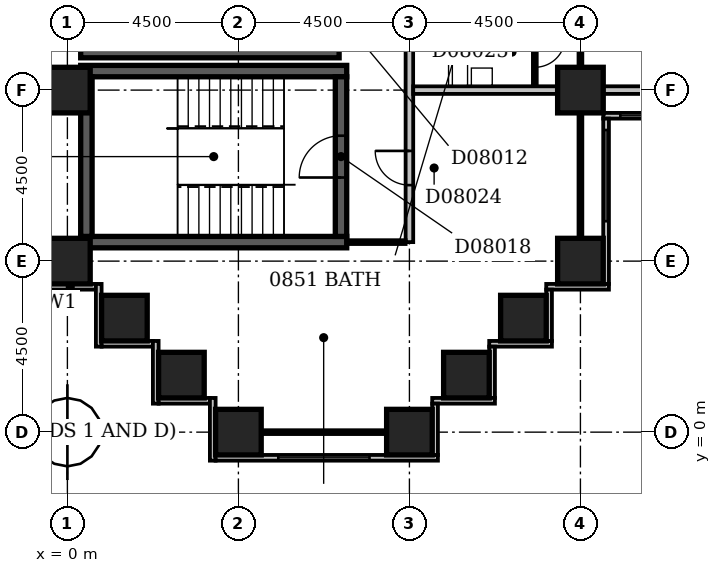
"""IFC4 building model, lengths in metres.
Left out: names, types, materials, properties, quantities, classifications, styles, units other than length and angle.
Written with IfcOpenShell. Run it as: python <this file> out.ifc"""

import sys

from ifc_helpers import new_model, si_unit, direction, frame, frame_2d, origin, origin_2d, place, context, subcontext, project, spatial, rectangle, extrude, element, fill, save


model = new_model("IFC4")
c1 = context("Model", 3, precision=1e-05, world=origin(), true_north=direction((0.0, 1.0)))
c2 = subcontext(c1, "Body", "Model", "MODEL_VIEW")
j1 = project(units=[si_unit("LENGTHUNIT", "METRE"), si_unit("PLANEANGLEUNIT", "RADIAN")], contexts=[c1])
p1 = place(None, origin())
s1 = spatial("IfcSite", under=j1, at=p1, CompositionType="ELEMENT")
p2 = place(p1, origin())
s2 = spatial("IfcBuilding", under=s1, at=p2, CompositionType="ELEMENT")
p3 = place(p2, frame((0.0, 0.0, 39.8)))
s3 = spatial("IfcBuildingStorey", under=s2, at=p3, CompositionType="ELEMENT", Elevation=39.8)
for number, where, z_axis, x_axis in (
    (1, (0.35, 5.0, -0.3), (0.0, 0.0, 1.0), (1.0, 0.0, 0.0)),
    (2, (0.35, 9.5, -0.3), (0.0, 0.0, 1.0), (1.0, 0.0, 0.0)),
):
    element("IfcWall", number, at=place(p3, frame(where, z_axis=z_axis, x_axis=x_axis)), inside=s3, PredefinedType="SHEAR", context=c2, shape_type="SweptSolid", body=[
        extrude(rectangle(XDim=7.0, YDim=0.3, at=frame_2d((3.5, 0.0))), origin(), (0.0, 0.0, 1.0), 3.6),
    ])
p4 = place(p3, frame((0.35, 10.0, -0.3), z_axis=(0.0, 0.0, 1.0), x_axis=(1.0, 0.0, 0.0)))
e3 = element("IfcWall", 3, at=p4, inside=s3, PredefinedType="SHEAR", context=c2, shape_type="SweptSolid", body=[
    extrude(rectangle(XDim=6.8, YDim=0.3, at=frame_2d((3.4, 0.0))), origin(), (0.0, 0.0, 1.0), 3.6),
])
p5 = place(p3, frame((0.5, 5.15, -0.3), z_axis=(0.0, 0.0, 1.0), x_axis=(0.0, 1.0, 0.0)))
e4 = element("IfcWall", 4, at=p5, inside=s3, PredefinedType="SHEAR", context=c2, shape_type="SweptSolid", body=[
    extrude(rectangle(XDim=4.2, YDim=0.3, at=frame_2d((2.1, 0.0))), origin(), (0.0, 0.0, 1.0), 3.6),
])
p6 = place(p3, frame((7.2, 5.15, -0.3), z_axis=(0.0, 0.0, 1.0), x_axis=(0.0, 1.0, 0.0)))
e5 = element("IfcWall", 5, at=p6, inside=s3, PredefinedType="SHEAR", context=c2, shape_type="SweptSolid", body=[
    extrude(rectangle(XDim=4.2, YDim=0.3, at=frame_2d((2.1, 0.0))), origin(), (0.0, 0.0, 1.0), 3.6),
])
p7 = place(p6, frame((1.55, 0.0, 0.3)))
e6 = element("IfcOpeningElement", 6, at=p7, cuts=e5, PredefinedType="OPENING", context=c2, shape_type="SweptSolid", body=[
    extrude(rectangle(XDim=1.1, YDim=2.1, at=frame_2d((0.55, 1.05))), frame((0.0, 0.162, 0.0), z_axis=(0.0, -1.0, 0.0), x_axis=(1.0, 0.0, 0.0)), (0.0, 0.0, 1.0), 0.324),
])
for number, where, z_axis, x_axis in (
    (7, (4.5, 0.0, -0.3), (0.0, 0.0, 1.0), (1.0, 0.0, 0.0)),
    (8, (9.0, 0.0, -0.3), (0.0, 0.0, 1.0), (1.0, 0.0, 0.0)),
    (9, (3.0, 1.5, -0.3), (0.0, 0.0, 1.0), (1.0, 0.0, 0.0)),
    (10, (10.5, 1.5, -0.3), (0.0, 0.0, 1.0), (1.0, 0.0, 0.0)),
    (11, (1.5, 3.0, -0.3), (0.0, 0.0, 1.0), (1.0, 0.0, 0.0)),
    (12, (12.0, 3.0, -0.3), (0.0, 0.0, 1.0), (1.0, 0.0, 0.0)),
    (13, (0.0, 4.5, -0.3), (0.0, 0.0, 1.0), (1.0, 0.0, 0.0)),
    (14, (13.5, 4.5, -0.3), (0.0, 0.0, 1.0), (1.0, 0.0, 0.0)),
    (15, (0.0, 9.0, -0.3), (0.0, 0.0, 1.0), (1.0, 0.0, 0.0)),
    (16, (13.5, 9.0, -0.3), (0.0, 0.0, 1.0), (1.0, 0.0, 0.0)),
):
    element("IfcColumn", number, at=place(p3, frame(where, z_axis=z_axis, x_axis=x_axis)), inside=s3, PredefinedType="COLUMN", context=c2, shape_type="SweptSolid", body=[
        extrude(rectangle(XDim=1.2, YDim=1.2, at=origin_2d()), origin(), (0.0, 0.0, 1.0), 3.6),
    ])
p8 = place(p3, frame((9.675, -0.6, 0.0), z_axis=(0.0, 0.0, 1.0), x_axis=(0.0, 1.0, 0.0)))
e17 = element("IfcWall", 17, at=p8, inside=s3, PredefinedType="STANDARD", context=c2, shape_type="SweptSolid", body=[
    extrude(rectangle(XDim=1.35, YDim=0.15, at=frame_2d((0.675, 0.0))), origin(), (0.0, 0.0, 1.0), 2.7),
])
p9 = place(p3, frame((9.6, 0.825, 0.0), z_axis=(0.0, 0.0, 1.0), x_axis=(1.0, 0.0, 0.0)))
e18 = element("IfcWall", 18, at=p9, inside=s3, PredefinedType="STANDARD", context=c2, shape_type="SweptSolid", body=[
    extrude(rectangle(XDim=1.65, YDim=0.15, at=frame_2d((0.825, 0.0))), origin(), (0.0, 0.0, 1.0), 2.7),
])
p10 = place(p3, frame((11.175, 0.9, 0.0), z_axis=(0.0, 0.0, 1.0), x_axis=(0.0, 1.0, 0.0)))
e19 = element("IfcWall", 19, at=p10, inside=s3, PredefinedType="STANDARD", context=c2, shape_type="SweptSolid", body=[
    extrude(rectangle(XDim=1.35, YDim=0.15, at=frame_2d((0.675, 0.0))), origin(), (0.0, 0.0, 1.0), 2.7),
])
p11 = place(p3, frame((11.1, 2.325, 0.0), z_axis=(0.0, 0.0, 1.0), x_axis=(1.0, 0.0, 0.0)))
e20 = element("IfcWall", 20, at=p11, inside=s3, PredefinedType="STANDARD", context=c2, shape_type="SweptSolid", body=[
    extrude(rectangle(XDim=1.65, YDim=0.15, at=frame_2d((0.825, 0.0))), origin(), (0.0, 0.0, 1.0), 2.7),
])
p12 = place(p3, frame((12.675, 2.4, 0.0), z_axis=(0.0, 0.0, 1.0), x_axis=(0.0, 1.0, 0.0)))
e21 = element("IfcWall", 21, at=p12, inside=s3, PredefinedType="STANDARD", context=c2, shape_type="SweptSolid", body=[
    extrude(rectangle(XDim=1.35, YDim=0.15, at=frame_2d((0.675, 0.0))), origin(), (0.0, 0.0, 1.0), 2.7),
])
p13 = place(p3, frame((12.6, 3.825, 0.0), z_axis=(0.0, 0.0, 1.0), x_axis=(1.0, 0.0, 0.0)))
e22 = element("IfcWall", 22, at=p13, inside=s3, PredefinedType="STANDARD", context=c2, shape_type="SweptSolid", body=[
    extrude(rectangle(XDim=1.65, YDim=0.15, at=frame_2d((0.825, 0.0))), origin(), (0.0, 0.0, 1.0), 2.7),
])
p14 = place(p3, frame((14.175, 3.9, 0.0), z_axis=(0.0, 0.0, 1.0), x_axis=(0.0, 1.0, 0.0)))
e23 = element("IfcWall", 23, at=p14, inside=s3, PredefinedType="STANDARD", context=c2, shape_type="SweptSolid", body=[
    extrude(rectangle(XDim=4.35, YDim=0.15, at=frame_2d((2.175, 0.0))), origin(), (0.0, 0.0, 1.0), 2.7),
])
p15 = place(p14, frame((1.65, 0.0, 0.6)))
e24 = element("IfcOpeningElement", 24, at=p15, cuts=e23, PredefinedType="OPENING", context=c2, shape_type="SweptSolid", body=[
    extrude(rectangle(XDim=2.4, YDim=1.8, at=frame_2d((1.2, 0.9))), frame((0.0, 0.087, 0.0), z_axis=(0.0, -1.0, 0.0), x_axis=(1.0, 0.0, 0.0)), (0.0, 0.0, 1.0), 0.174),
])
p16 = place(p3, frame((14.1, 8.325, 0.0), z_axis=(0.0, 0.0, 1.0), x_axis=(1.0, 0.0, 0.0)))
e25 = element("IfcWall", 25, at=p16, inside=s3, PredefinedType="STANDARD", context=c2, shape_type="SweptSolid", body=[
    extrude(rectangle(XDim=4.65, YDim=0.15, at=frame_2d((2.325, 0.0))), origin(), (0.0, 0.0, 1.0), 2.7),
])
p17 = place(p16, frame((0.45, 0.0, 0.6)))
e26 = element("IfcOpeningElement", 26, at=p17, cuts=e25, PredefinedType="OPENING", context=c2, shape_type="SweptSolid", body=[
    extrude(rectangle(XDim=2.4, YDim=1.8, at=frame_2d((1.2, 0.9))), frame((0.0, 0.087, 0.0), z_axis=(0.0, -1.0, 0.0), x_axis=(1.0, 0.0, 0.0)), (0.0, 0.0, 1.0), 0.174),
])
p18 = place(p3, frame((-0.6, 3.825, 0.0), z_axis=(0.0, 0.0, 1.0), x_axis=(1.0, 0.0, 0.0)))
e27 = element("IfcWall", 27, at=p18, inside=s3, PredefinedType="STANDARD", context=c2, shape_type="SweptSolid", body=[
    extrude(rectangle(XDim=1.35, YDim=0.15, at=frame_2d((0.675, 0.0))), origin(), (0.0, 0.0, 1.0), 2.7),
])
p19 = place(p3, frame((0.825, 3.9, 0.0), z_axis=(0.0, 0.0, 1.0), x_axis=(0.0, -1.0, 0.0)))
e28 = element("IfcWall", 28, at=p19, inside=s3, PredefinedType="STANDARD", context=c2, shape_type="SweptSolid", body=[
    extrude(rectangle(XDim=1.65, YDim=0.15, at=frame_2d((0.825, 0.0))), origin(), (0.0, 0.0, 1.0), 2.7),
])
p20 = place(p3, frame((0.9, 2.325, 0.0), z_axis=(0.0, 0.0, 1.0), x_axis=(1.0, 0.0, 0.0)))
e29 = element("IfcWall", 29, at=p20, inside=s3, PredefinedType="STANDARD", context=c2, shape_type="SweptSolid", body=[
    extrude(rectangle(XDim=1.35, YDim=0.15, at=frame_2d((0.675, 0.0))), origin(), (0.0, 0.0, 1.0), 2.7),
])
p21 = place(p3, frame((2.325, 2.4, 0.0), z_axis=(0.0, 0.0, 1.0), x_axis=(0.0, -1.0, 0.0)))
e30 = element("IfcWall", 30, at=p21, inside=s3, PredefinedType="STANDARD", context=c2, shape_type="SweptSolid", body=[
    extrude(rectangle(XDim=1.65, YDim=0.15, at=frame_2d((0.825, 0.0))), origin(), (0.0, 0.0, 1.0), 2.7),
])
p22 = place(p3, frame((2.4, 0.825, 0.0), z_axis=(0.0, 0.0, 1.0), x_axis=(1.0, 0.0, 0.0)))
e31 = element("IfcWall", 31, at=p22, inside=s3, PredefinedType="STANDARD", context=c2, shape_type="SweptSolid", body=[
    extrude(rectangle(XDim=1.35, YDim=0.15, at=frame_2d((0.675, 0.0))), origin(), (0.0, 0.0, 1.0), 2.7),
])
p23 = place(p3, frame((3.825, 0.9, 0.0), z_axis=(0.0, 0.0, 1.0), x_axis=(0.0, -1.0, 0.0)))
e32 = element("IfcWall", 32, at=p23, inside=s3, PredefinedType="STANDARD", context=c2, shape_type="SweptSolid", body=[
    extrude(rectangle(XDim=1.65, YDim=0.15, at=frame_2d((0.825, 0.0))), origin(), (0.0, 0.0, 1.0), 2.7),
])
p24 = place(p3, frame((3.9, -0.675, 0.0), z_axis=(0.0, 0.0, 1.0), x_axis=(1.0, 0.0, 0.0)))
e33 = element("IfcWall", 33, at=p24, inside=s3, PredefinedType="STANDARD", context=c2, shape_type="SweptSolid", body=[
    extrude(rectangle(XDim=5.85, YDim=0.15, at=frame_2d((2.925, 0.0))), origin(), (0.0, 0.0, 1.0), 2.7),
])
p25 = place(p24, frame((1.65, 0.0, 0.6)))
e34 = element("IfcOpeningElement", 34, at=p25, cuts=e33, PredefinedType="OPENING", context=c2, shape_type="SweptSolid", body=[
    extrude(rectangle(XDim=2.4, YDim=1.8, at=frame_2d((1.2, 0.9))), frame((0.0, 0.087, 0.0), z_axis=(0.0, -1.0, 0.0), x_axis=(1.0, 0.0, 0.0)), (0.0, 0.0, 1.0), 0.174),
])
p26 = place(p3, frame((5.1, 0.0, 0.0), z_axis=(0.0, 0.0, 1.0), x_axis=(1.0, 0.0, 0.0)))
e35 = element("IfcWall", 35, at=p26, inside=s3, PredefinedType="PARTITIONING", context=c2, shape_type="SweptSolid", body=[
    extrude(rectangle(XDim=3.3, YDim=0.1, at=frame_2d((1.65, 0.0))), origin(), (0.0, 0.0, 1.0), 2.7),
])
p27 = place(p3, frame((0.0, 4.4, 0.0), z_axis=(0.0, 0.0, 1.0), x_axis=(0.0, 1.0, 0.0)))
e36 = element("IfcWall", 36, at=p27, inside=s3, PredefinedType="PARTITIONING", context=c2, shape_type="SweptSolid", body=[
    extrude(rectangle(XDim=0.7, YDim=0.1, at=frame_2d((0.35, 0.0))), origin(), (0.0, 0.0, 1.0), 2.7),
])
p28 = place(p3, frame((7.349, 5.0, 0.0), z_axis=(0.0, 0.0, 1.0), x_axis=(1.0, 0.0, 0.0)))
e37 = element("IfcWall", 37, at=p28, inside=s3, PredefinedType="PARTITIONING", context=c2, shape_type="SweptSolid", body=[
    extrude(rectangle(XDim=1.551, YDim=0.1, at=frame_2d((0.775, 0.0))), origin(), (0.0, 0.0, 1.0), 3.3),
])
p29 = place(p3, frame((9.0, 5.0, 0.0), z_axis=(0.0, 0.0, 1.0), x_axis=(0.0, 1.0, 0.0)))
e38 = element("IfcWall", 38, at=p29, inside=s3, PredefinedType="PARTITIONING", context=c2, shape_type="SweptSolid", body=[
    extrude(rectangle(XDim=44.5, YDim=0.2, at=frame_2d((22.25, 0.0))), origin(), (0.0, 0.0, 1.0), 3.3),
])
p30 = place(p29, frame((17.8, 0.0, 0.0)))
e39 = element("IfcOpeningElement", 39, at=p30, cuts=e38, PredefinedType="OPENING", context=c2, shape_type="SweptSolid", body=[
    extrude(rectangle(XDim=1.0, YDim=2.1, at=frame_2d((0.5, 1.05))), frame((0.0, 0.112, 0.0), z_axis=(0.0, -1.0, 0.0), x_axis=(1.0, 0.0, 0.0)), (0.0, 0.0, 1.0), 0.224),
])
p31 = place(p29, frame((14.95, 0.0, 0.0)))
e40 = element("IfcOpeningElement", 40, at=p31, cuts=e38, PredefinedType="OPENING", context=c2, shape_type="SweptSolid", body=[
    extrude(rectangle(XDim=1.0, YDim=2.1, at=frame_2d((0.5, 1.05))), frame((0.0, 0.112, 0.0), z_axis=(0.0, -1.0, 0.0), x_axis=(1.0, 0.0, 0.0)), (0.0, 0.0, 1.0), 0.224),
])
p32 = place(p29, frame((10.45, 0.0, 0.0)))
e41 = element("IfcOpeningElement", 41, at=p32, cuts=e38, PredefinedType="OPENING", context=c2, shape_type="SweptSolid", body=[
    extrude(rectangle(XDim=1.0, YDim=2.1, at=frame_2d((0.5, 1.05))), frame((0.0, 0.112, 0.0), z_axis=(0.0, -1.0, 0.0), x_axis=(1.0, 0.0, 0.0)), (0.0, 0.0, 1.0), 0.224),
])
p33 = place(p29, frame((5.95, 0.0, 0.0)))
e42 = element("IfcOpeningElement", 42, at=p33, cuts=e38, PredefinedType="OPENING", context=c2, shape_type="SweptSolid", body=[
    extrude(rectangle(XDim=1.0, YDim=2.1, at=frame_2d((0.5, 1.05))), frame((0.0, 0.112, 0.0), z_axis=(0.0, -1.0, 0.0), x_axis=(1.0, 0.0, 0.0)), (0.0, 0.0, 1.0), 0.224),
])
p34 = place(p29, frame((32.75, 0.0, 0.0)))
e43 = element("IfcOpeningElement", 43, at=p34, cuts=e38, PredefinedType="OPENING", context=c2, shape_type="SweptSolid", body=[
    extrude(rectangle(XDim=0.9, YDim=2.1, at=frame_2d((0.45, 1.05))), frame((0.0, 0.112, 0.0), z_axis=(0.0, -1.0, 0.0), x_axis=(1.0, 0.0, 0.0)), (0.0, 0.0, 1.0), 0.224),
])
p35 = place(p29, frame((1.5, 0.0, 0.0)))
e44 = element("IfcOpeningElement", 44, at=p35, cuts=e38, PredefinedType="OPENING", context=c2, shape_type="SweptSolid", body=[
    extrude(rectangle(XDim=0.9, YDim=2.1, at=frame_2d((0.45, 1.05))), frame((0.0, 0.112, 0.0), z_axis=(0.0, -1.0, 0.0), x_axis=(1.0, 0.0, 0.0)), (0.0, 0.0, 1.0), 0.224),
])
p36 = place(p3, frame((13.5, 5.1, 0.0), z_axis=(0.0, 0.0, 1.0), x_axis=(0.0, 1.0, 0.0)))
e45 = element("IfcWall", 45, at=p36, inside=s3, PredefinedType="PARTITIONING", context=c2, shape_type="SweptSolid", body=[
    extrude(rectangle(XDim=3.3, YDim=0.1, at=frame_2d((1.65, 0.0))), origin(), (0.0, 0.0, 1.0), 2.7),
])
p37 = place(p3, frame((9.1, 9.0, 0.0), z_axis=(0.0, 0.0, 1.0), x_axis=(1.0, 0.0, 0.0)))
e46 = element("IfcWall", 46, at=p37, inside=s3, PredefinedType="PARTITIONING", context=c2, shape_type="SweptSolid", body=[
    extrude(rectangle(XDim=3.8, YDim=0.2, at=frame_2d((1.9, 0.0))), origin(), (0.0, 0.0, 1.0), 3.3),
])
p38 = place(p3, frame((14.1, 9.0, 0.0), z_axis=(0.0, 0.0, 1.0), x_axis=(1.0, 0.0, 0.0)))
e47 = element("IfcWall", 47, at=p38, inside=s3, PredefinedType="PARTITIONING", context=c2, shape_type="SweptSolid", body=[
    extrude(rectangle(XDim=3.3, YDim=0.2, at=frame_2d((1.65, 0.0))), origin(), (0.0, 0.0, 1.0), 2.7),
])
p39 = place(p3, frame((12.3, 9.1, 0.0), z_axis=(0.0, 0.0, 1.0), x_axis=(0.0, 1.0, 0.0)))
e48 = element("IfcWall", 48, at=p39, inside=s3, PredefinedType="PARTITIONING", context=c2, shape_type="SweptSolid", body=[
    extrude(rectangle(XDim=1.6, YDim=0.1, at=frame_2d((0.8, 0.0))), origin(), (0.0, 0.0, 1.0), 3.3),
])
p40 = place(p39, frame((0.5, 0.0, 0.0)))
e49 = element("IfcOpeningElement", 49, at=p40, cuts=e48, PredefinedType="OPENING", context=c2, shape_type="SweptSolid", body=[
    extrude(rectangle(XDim=0.8, YDim=2.1, at=frame_2d((0.4, 1.05))), frame((0.0, 0.062, 0.0), z_axis=(0.0, -1.0, 0.0), x_axis=(1.0, 0.0, 0.0)), (0.0, 0.0, 1.0), 0.124),
])
p41 = place(p3, frame((13.5, 9.6, 0.0), z_axis=(0.0, 0.0, 1.0), x_axis=(0.0, 1.0, 0.0)))
e50 = element("IfcWall", 50, at=p41, inside=s3, PredefinedType="PARTITIONING", context=c2, shape_type="SweptSolid", body=[
    extrude(rectangle(XDim=8.3, YDim=0.1, at=frame_2d((4.15, 0.0))), origin(), (0.0, 0.0, 1.0), 3.3),
])
p42 = place(p41, frame((5.7, 0.0, 0.0)))
e51 = element("IfcOpeningElement", 51, at=p42, cuts=e50, PredefinedType="OPENING", context=c2, shape_type="SweptSolid", body=[
    extrude(rectangle(XDim=0.9, YDim=2.1, at=frame_2d((0.45, 1.05))), frame((0.0, 0.062, 0.0), z_axis=(0.0, -1.0, 0.0), x_axis=(1.0, 0.0, 0.0)), (0.0, 0.0, 1.0), 0.124),
])
p43 = place(p41, frame((1.2, 0.0, 0.0)))
e52 = element("IfcOpeningElement", 52, at=p43, cuts=e50, PredefinedType="OPENING", context=c2, shape_type="SweptSolid", body=[
    extrude(rectangle(XDim=0.9, YDim=2.1, at=frame_2d((0.45, 1.05))), frame((0.0, 0.062, 0.0), z_axis=(0.0, -1.0, 0.0), x_axis=(1.0, 0.0, 0.0)), (0.0, 0.0, 1.0), 0.124),
])
p44 = place(p15, origin())
e53 = element("IfcWindow", 53, at=p44, inside=s3, PartitioningType="SINGLE_PANEL", PredefinedType="WINDOW", context=c2, shape_type="SweptSolid", body=[
    extrude(rectangle(XDim=2.4, YDim=1.8, at=frame_2d((1.2, 0.9))), frame((0.0, 0.03, 0.0), z_axis=(0.0, -1.0, 0.0), x_axis=(1.0, 0.0, 0.0)), (0.0, 0.0, 1.0), 0.06),
])
fill(e24, e53)
p45 = place(p17, origin())
e54 = element("IfcWindow", 54, at=p45, inside=s3, PartitioningType="SINGLE_PANEL", PredefinedType="WINDOW", context=c2, shape_type="SweptSolid", body=[
    extrude(rectangle(XDim=2.4, YDim=1.8, at=frame_2d((1.2, 0.9))), frame((0.0, 0.03, 0.0), z_axis=(0.0, -1.0, 0.0), x_axis=(1.0, 0.0, 0.0)), (0.0, 0.0, 1.0), 0.06),
])
fill(e26, e54)
p46 = place(p25, origin())
e55 = element("IfcWindow", 55, at=p46, inside=s3, PartitioningType="SINGLE_PANEL", PredefinedType="WINDOW", context=c2, shape_type="SweptSolid", body=[
    extrude(rectangle(XDim=2.4, YDim=1.8, at=frame_2d((1.2, 0.9))), frame((0.0, 0.03, 0.0), z_axis=(0.0, -1.0, 0.0), x_axis=(1.0, 0.0, 0.0)), (0.0, 0.0, 1.0), 0.06),
])
fill(e34, e55)
p47 = place(p7, origin())
e56 = element("IfcDoor", 56, at=p47, inside=s3, OperationType="SINGLE_SWING_LEFT", PredefinedType="DOOR", context=c2, shape_type="SweptSolid", body=[
    extrude(rectangle(XDim=1.1, YDim=2.1, at=frame_2d((0.55, 1.05))), frame((0.0, 0.025, 0.0), z_axis=(0.0, -1.0, 0.0), x_axis=(1.0, 0.0, 0.0)), (0.0, 0.0, 1.0), 0.05),
])
fill(e6, e56)
p48 = place(p35, frame((0.9, 0.0, 0.0), z_axis=(0.0, 0.0, 1.0), x_axis=(-1.0, 0.0, 0.0)))
e57 = element("IfcDoor", 57, at=p48, inside=s3, OperationType="SINGLE_SWING_LEFT", PredefinedType="DOOR", context=c2, shape_type="SweptSolid", body=[
    extrude(rectangle(XDim=0.9, YDim=2.1, at=frame_2d((0.45, 1.05))), frame((0.0, 0.025, 0.0), z_axis=(0.0, -1.0, 0.0), x_axis=(1.0, 0.0, 0.0)), (0.0, 0.0, 1.0), 0.05),
])
fill(e44, e57)
p49 = place(p40, origin())
e58 = element("IfcDoor", 58, at=p49, inside=s3, OperationType="SINGLE_SWING_RIGHT", PredefinedType="DOOR", context=c2, shape_type="SweptSolid", body=[
    extrude(rectangle(XDim=0.8, YDim=2.1, at=frame_2d((0.4, 1.05))), frame((0.0, 0.025, 0.0), z_axis=(0.0, -1.0, 0.0), x_axis=(1.0, 0.0, 0.0)), (0.0, 0.0, 1.0), 0.05),
])
fill(e49, e58)
save(model, sys.argv[1])
